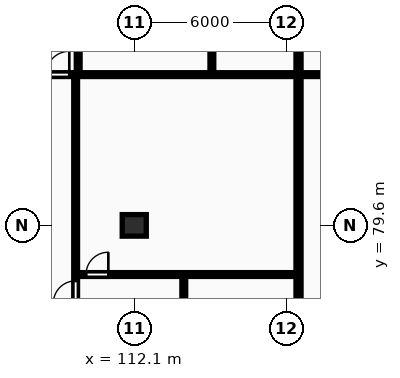
"""IFC4 building model, lengths in metres.
Left out: names, types, materials, properties, quantities, classifications, styles, units other than length and angle.
Written with IfcOpenShell. Run it as: python <this file> out.ifc"""

import sys

from ifc_helpers import new_model, si_unit, direction, frame, frame_2d, origin, origin_2d, place, context, subcontext, project, spatial, rectangle, extrude, element, fill, save


model = new_model("IFC4")
c1 = context("Model", 3, precision=1e-05, world=origin(), true_north=direction((0.0, 1.0)))
c2 = subcontext(c1, "Body", "Model", "MODEL_VIEW")
j1 = project(units=[si_unit("LENGTHUNIT", "METRE"), si_unit("PLANEANGLEUNIT", "RADIAN")], contexts=[c1])
p1 = place(None, origin())
s1 = spatial("IfcSite", under=j1, at=p1, CompositionType="ELEMENT")
p2 = place(p1, origin())
s2 = spatial("IfcBuilding", under=s1, at=p2, CompositionType="ELEMENT")
p3 = place(p2, frame((0.0, 0.0, 113.3)))
s3 = spatial("IfcBuildingStorey", under=s2, at=p3, CompositionType="ELEMENT", Elevation=113.3)
p4 = place(p3, frame((112.1, 79.6, 0.0), z_axis=(0.0, 0.0, 1.0), x_axis=(1.0, 0.0, 0.0)))
e1 = element("IfcColumn", 1, at=p4, inside=s3, PredefinedType="COLUMN", context=c2, shape_type="SweptSolid", body=[
    extrude(rectangle(XDim=0.95, YDim=0.85, at=origin_2d()), origin(), (0.0, 0.0, 1.0), 3.25),
])
p5 = place(p3, frame((118.584, 69.83, 0.0), z_axis=(0.0, 0.0, 1.0), x_axis=(0.0, 1.0, 0.0)))
e2 = element("IfcWall", 2, at=p5, inside=s3, PredefinedType="PARTITIONING", context=c2, shape_type="SweptSolid", body=[
    extrude(rectangle(XDim=26.07, YDim=0.2, at=frame_2d((13.035, 0.0))), origin(), (0.0, 0.0, 1.0), 2.97),
])
p6 = place(p3, frame((114.055, 69.81, 0.0), z_axis=(0.0, 0.0, 1.0), x_axis=(0.0, 1.0, 0.0)))
e3 = element("IfcWall", 3, at=p6, inside=s3, PredefinedType="PARTITIONING", context=c2, shape_type="SweptSolid", body=[
    extrude(rectangle(XDim=7.85, YDim=0.15, at=frame_2d((3.925, 0.0))), origin(), (0.0, 0.0, 1.0), 2.97),
])
p7 = place(p6, frame((3.505, 0.0, 0.0)))
e4 = element("IfcOpeningElement", 4, at=p7, cuts=e3, PredefinedType="OPENING", context=c2, shape_type="SweptSolid", body=[
    extrude(rectangle(XDim=0.84, YDim=2.04, at=frame_2d((0.42, 1.02))), frame((0.0, 0.085, 0.0), z_axis=(0.0, -1.0, 0.0), x_axis=(1.0, 0.0, 0.0)), (0.0, 0.0, 1.0), 0.17),
])
p8 = place(p3, frame((109.847, 77.66, 0.0), z_axis=(0.0, 0.0, 1.0), x_axis=(1.0, 0.0, 0.0)))
e5 = element("IfcWall", 5, at=p8, inside=s3, PredefinedType="PARTITIONING", context=c2, shape_type="SweptSolid", body=[
    extrude(rectangle(XDim=8.657, YDim=0.15, at=frame_2d((4.329, 0.0))), origin(), (0.0, 0.0, 1.0), 2.97),
])
p9 = place(p8, frame((0.35, 0.0, 0.0)))
e6 = element("IfcOpeningElement", 6, at=p9, cuts=e5, PredefinedType="OPENING", context=c2, shape_type="SweptSolid", body=[
    extrude(rectangle(XDim=0.88, YDim=2.06, at=frame_2d((0.44, 1.03))), frame((0.0, 0.085, 0.0), z_axis=(0.0, -1.0, 0.0), x_axis=(1.0, 0.0, 0.0)), (0.0, 0.0, 1.0), 0.17),
])
p10 = place(p3, frame((109.787, 69.81, 0.0), z_axis=(0.0, 0.0, 1.0), x_axis=(0.0, 1.0, 0.0)))
e7 = element("IfcWall", 7, at=p10, inside=s3, PredefinedType="PARTITIONING", context=c2, shape_type="SweptSolid", body=[
    extrude(rectangle(XDim=15.7, YDim=0.15, at=frame_2d((7.85, 0.0))), origin(), (0.0, 0.0, 1.0), 2.97),
])
p11 = place(p10, frame((6.72, 0.0, 0.0)))
e8 = element("IfcOpeningElement", 8, at=p11, cuts=e7, PredefinedType="OPENING", context=c2, shape_type="SweptSolid", body=[
    extrude(rectangle(XDim=0.88, YDim=2.06, at=frame_2d((0.44, 1.03))), frame((0.0, 0.085, 0.0), z_axis=(0.0, -1.0, 0.0), x_axis=(1.0, 0.0, 0.0)), (0.0, 0.0, 1.0), 0.17),
])
p12 = place(p3, frame((109.887, 85.59, 0.0), z_axis=(0.0, 0.0, 1.0), x_axis=(0.0, 1.0, 0.0)))
e9 = element("IfcWall", 9, at=p12, inside=s3, PredefinedType="PARTITIONING", context=c2, shape_type="SweptSolid", body=[
    extrude(rectangle(XDim=5.0, YDim=0.15, at=frame_2d((2.5, 0.0))), origin(), (0.0, 0.0, 1.0), 2.97),
])
p13 = place(p12, frame((2.06, 0.0, 0.0)))
e10 = element("IfcOpeningElement", 10, at=p13, cuts=e9, PredefinedType="OPENING", context=c2, shape_type="SweptSolid", body=[
    extrude(rectangle(XDim=0.88, YDim=2.06, at=frame_2d((0.44, 1.03))), frame((0.0, 0.085, 0.0), z_axis=(0.0, -1.0, 0.0), x_axis=(1.0, 0.0, 0.0)), (0.0, 0.0, 1.0), 0.17),
])
p14 = place(p3, frame((115.164, 85.59, 0.0), z_axis=(0.0, 0.0, 1.0), x_axis=(0.0, 1.0, 0.0)))
e11 = element("IfcWall", 11, at=p14, inside=s3, PredefinedType="PARTITIONING", context=c2, shape_type="SweptSolid", body=[
    extrude(rectangle(XDim=10.31, YDim=0.15, at=frame_2d((5.155, 0.0))), origin(), (0.0, 0.0, 1.0), 2.97),
])
p15 = place(p14, frame((1.43, 0.0, 0.0)))
e12 = element("IfcOpeningElement", 12, at=p15, cuts=e11, PredefinedType="OPENING", context=c2, shape_type="SweptSolid", body=[
    extrude(rectangle(XDim=0.84, YDim=2.04, at=frame_2d((0.42, 1.02))), frame((0.0, 0.085, 0.0), z_axis=(0.0, -1.0, 0.0), x_axis=(1.0, 0.0, 0.0)), (0.0, 0.0, 1.0), 0.17),
])
p16 = place(p14, frame((3.92, 0.0, 0.0)))
e13 = element("IfcOpeningElement", 13, at=p16, cuts=e11, PredefinedType="OPENING", context=c2, shape_type="SweptSolid", body=[
    extrude(rectangle(XDim=0.84, YDim=2.04, at=frame_2d((0.42, 1.02))), frame((0.0, 0.085, 0.0), z_axis=(0.0, -1.0, 0.0), x_axis=(1.0, 0.0, 0.0)), (0.0, 0.0, 1.0), 0.17),
])
p17 = place(p14, frame((5.48, 0.0, 0.0)))
e14 = element("IfcOpeningElement", 14, at=p17, cuts=e11, PredefinedType="OPENING", context=c2, shape_type="SweptSolid", body=[
    extrude(rectangle(XDim=0.88, YDim=2.06, at=frame_2d((0.44, 1.03))), frame((0.0, 0.085, 0.0), z_axis=(0.0, -1.0, 0.0), x_axis=(1.0, 0.0, 0.0)), (0.0, 0.0, 1.0), 0.17),
])
p18 = place(p3, frame((105.896, 85.55, 0.0), z_axis=(0.0, 0.0, 1.0), x_axis=(1.0, 0.0, 0.0)))
e15 = element("IfcWall", 15, at=p18, inside=s3, PredefinedType="PARTITIONING", context=c2, shape_type="SweptSolid", body=[
    extrude(rectangle(XDim=12.607, YDim=0.15, at=frame_2d((6.304, 0.0))), origin(), (0.0, 0.0, 1.0), 2.97),
])
p19 = place(p18, frame((2.72, 0.0, 0.0)))
e16 = element("IfcOpeningElement", 16, at=p19, cuts=e15, PredefinedType="OPENING", context=c2, shape_type="SweptSolid", body=[
    extrude(rectangle(XDim=0.92, YDim=2.08, at=frame_2d((0.46, 1.04))), frame((0.0, 0.085, 0.0), z_axis=(0.0, -1.0, 0.0), x_axis=(1.0, 0.0, 0.0)), (0.0, 0.0, 1.0), 0.17),
])
p20 = place(p3, frame((118.664, 85.55, 0.0), z_axis=(0.0, 0.0, 1.0), x_axis=(1.0, 0.0, 0.0)))
e17 = element("IfcWall", 17, at=p20, inside=s3, PredefinedType="PARTITIONING", context=c2, shape_type="SweptSolid", body=[
    extrude(rectangle(XDim=11.856, YDim=0.15, at=frame_2d((5.928, 0.0))), origin(), (0.0, 0.0, 1.0), 2.97),
])
p21 = place(p20, frame((2.72, 0.0, 0.0)))
e18 = element("IfcOpeningElement", 18, at=p21, cuts=e17, PredefinedType="OPENING", context=c2, shape_type="SweptSolid", body=[
    extrude(rectangle(XDim=0.92, YDim=2.08, at=frame_2d((0.46, 1.04))), frame((0.0, 0.085, 0.0), z_axis=(0.0, -1.0, 0.0), x_axis=(1.0, 0.0, 0.0)), (0.0, 0.0, 1.0), 0.17),
])
p22 = place(p9, origin())
e19 = element("IfcDoor", 19, at=p22, inside=s3, OperationType="SINGLE_SWING_RIGHT", PredefinedType="DOOR", context=c2, shape_type="SweptSolid", body=[
    extrude(rectangle(XDim=0.88, YDim=2.06, at=frame_2d((0.44, 1.03))), frame((0.0, 0.025, 0.0), z_axis=(0.0, -1.0, 0.0), x_axis=(1.0, 0.0, 0.0)), (0.0, 0.0, 1.0), 0.05),
])
fill(e6, e19)
p23 = place(p11, origin())
e20 = element("IfcDoor", 20, at=p23, inside=s3, OperationType="SINGLE_SWING_LEFT", PredefinedType="DOOR", context=c2, shape_type="SweptSolid", body=[
    extrude(rectangle(XDim=0.88, YDim=2.06, at=frame_2d((0.44, 1.03))), frame((0.0, 0.025, 0.0), z_axis=(0.0, -1.0, 0.0), x_axis=(1.0, 0.0, 0.0)), (0.0, 0.0, 1.0), 0.05),
])
fill(e8, e20)
p24 = place(p19, origin())
e21 = element("IfcDoor", 21, at=p24, inside=s3, OperationType="SINGLE_SWING_RIGHT", PredefinedType="DOOR", context=c2, shape_type="SweptSolid", body=[
    extrude(rectangle(XDim=0.92, YDim=2.08, at=frame_2d((0.46, 1.04))), frame((0.0, 0.025, 0.0), z_axis=(0.0, -1.0, 0.0), x_axis=(1.0, 0.0, 0.0)), (0.0, 0.0, 1.0), 0.05),
])
fill(e16, e21)
save(model, sys.argv[1])
